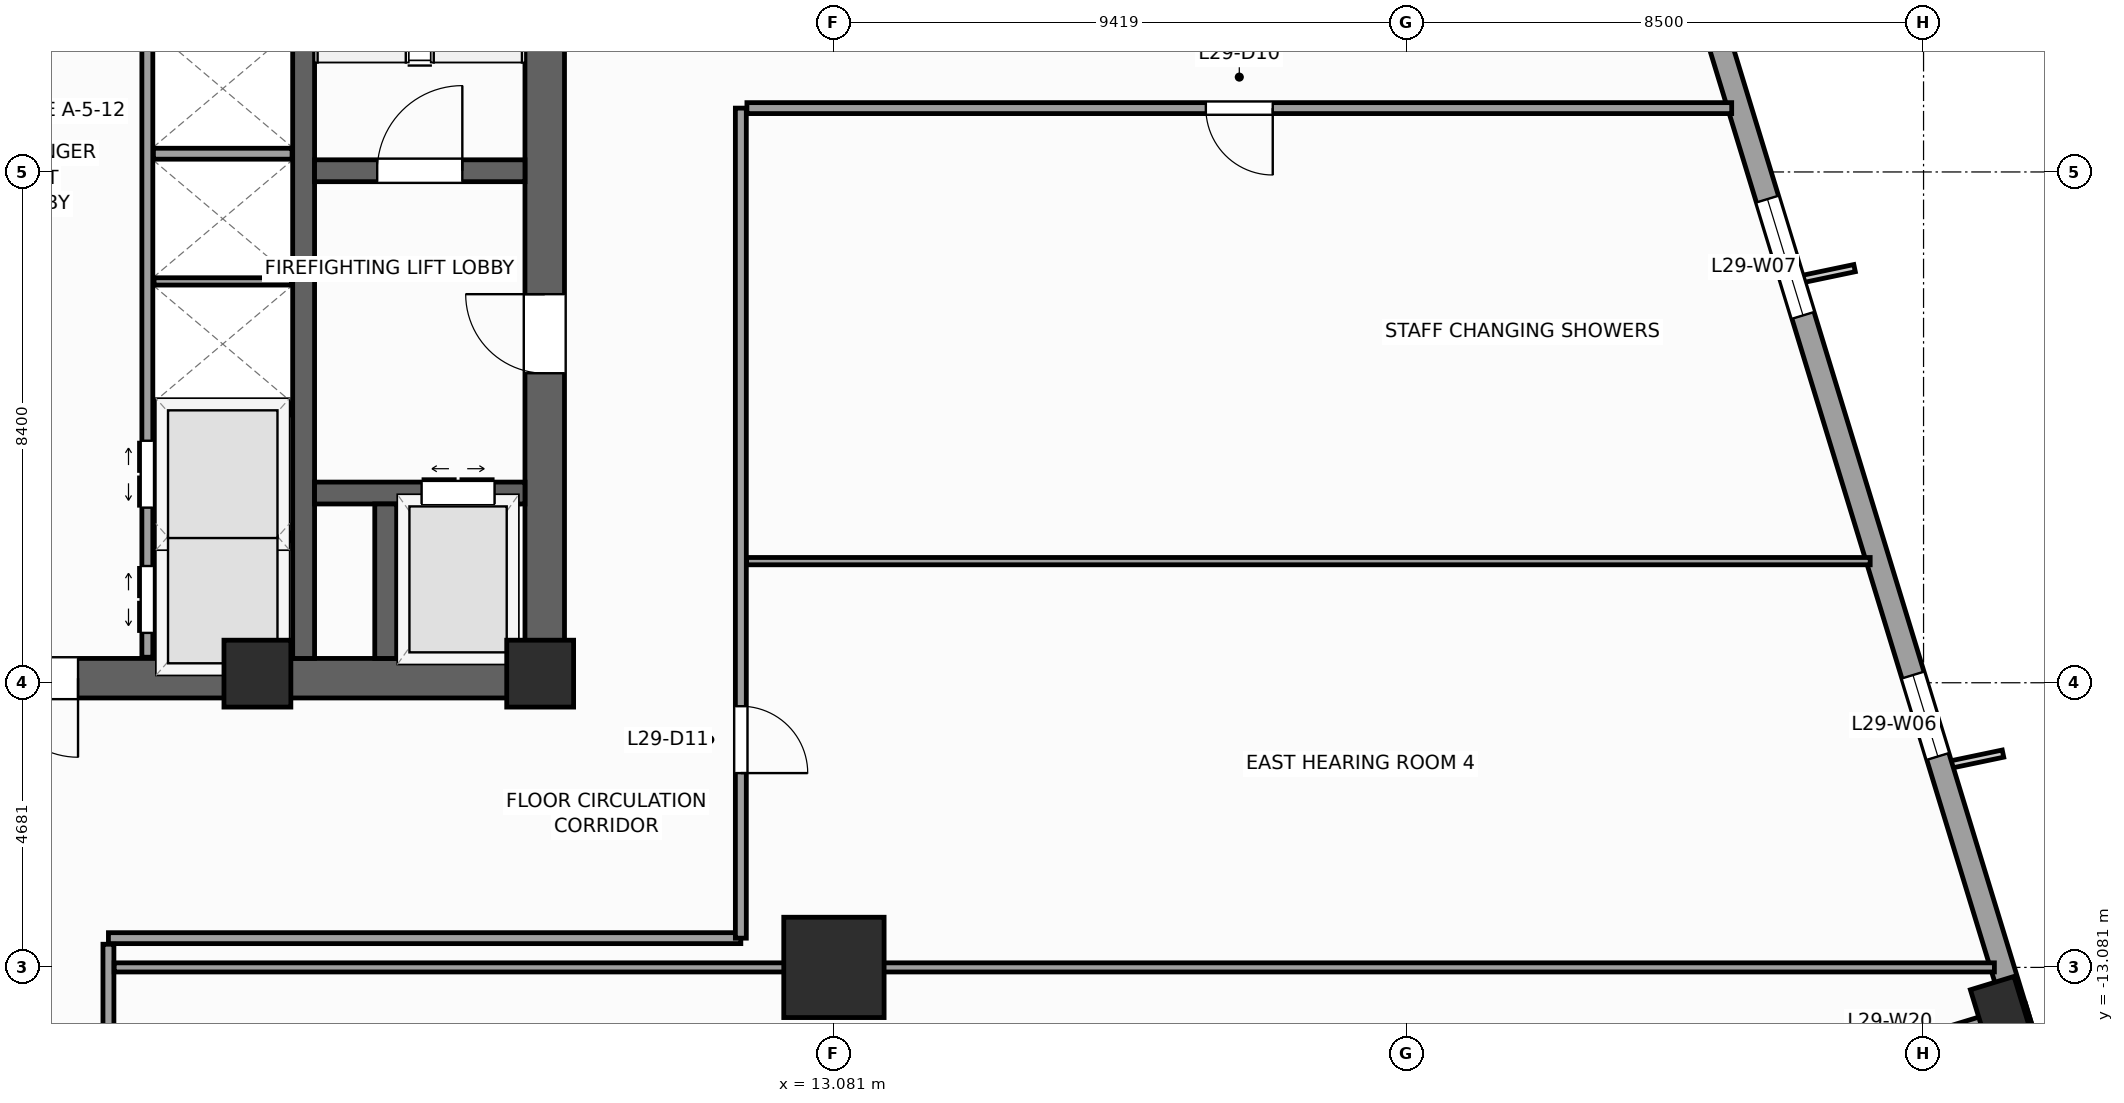
"""IFC4 building model, lengths in metres.
Left out: names, types, materials, properties, quantities, classifications, styles, units other than length and angle.
Written with IfcOpenShell. Run it as: python <this file> out.ifc"""

import sys

from ifc_helpers import new_model, si_unit, direction, frame, frame_2d, origin, origin_2d, place, context, subcontext, project, spatial, rectangle, extrude, source, transform, mapped, element, fill, save


model = new_model("IFC4")
c1 = context("Model", 3, precision=1e-05, world=origin(), true_north=direction((0.0, 1.0)))
c2 = subcontext(c1, "Body", "Model", "MODEL_VIEW")
j1 = project(units=[si_unit("LENGTHUNIT", "METRE"), si_unit("PLANEANGLEUNIT", "RADIAN")], contexts=[c1])
p1 = place(None, origin())
s1 = spatial("IfcSite", under=j1, at=p1, CompositionType="ELEMENT")
p2 = place(p1, origin())
s2 = spatial("IfcBuilding", under=s1, at=p2, CompositionType="ELEMENT")
p3 = place(p2, frame((0.0, 0.0, 123.2)))
s3 = spatial("IfcBuildingStorey", under=s2, at=p3, CompositionType="ELEMENT", Elevation=123.2)
p4 = place(p3, frame((-8.65, -8.325, 0.0), z_axis=(0.0, 0.0, 1.0), x_axis=(1.0, 0.0, 0.0)))
e1 = element("IfcWall", 1, at=p4, inside=s3, PredefinedType="SHEAR", context=c2, shape_type="SweptSolid", body=[
    extrude(rectangle(XDim=17.3, YDim=0.65, at=frame_2d((8.65, 0.0))), origin(), (0.0, 0.0, 1.0), 4.0),
])
p5 = place(p4, frame((8.0, 0.0, 0.0)))
e2 = element("IfcOpeningElement", 2, at=p5, cuts=e1, PredefinedType="OPENING", context=c2, shape_type="SweptSolid", body=[
    extrude(rectangle(XDim=1.3, YDim=2.2, at=frame_2d((0.65, 1.1))), frame((0.0, 0.335, 0.0), z_axis=(0.0, -1.0, 0.0), x_axis=(1.0, 0.0, 0.0)), (0.0, 0.0, 1.0), 0.67),
])
p6 = place(p3, frame((8.325, -8.0, 0.0), z_axis=(0.0, 0.0, 1.0), x_axis=(0.0, 1.0, 0.0)))
e3 = element("IfcWall", 3, at=p6, inside=s3, PredefinedType="SHEAR", context=c2, shape_type="SweptSolid", body=[
    extrude(rectangle(XDim=16.0, YDim=0.65, at=frame_2d((8.0, 0.0))), origin(), (0.0, 0.0, 1.0), 4.0),
])
p7 = place(p6, frame((4.69, 0.0, 0.0)))
e4 = element("IfcOpeningElement", 4, at=p7, cuts=e3, PredefinedType="OPENING", context=c2, shape_type="SweptSolid", body=[
    extrude(rectangle(XDim=1.3, YDim=2.2, at=frame_2d((0.65, 1.1))), frame((0.0, 0.335, 0.0), z_axis=(0.0, -1.0, 0.0), x_axis=(1.0, 0.0, 0.0)), (0.0, 0.0, 1.0), 0.67),
])
p8 = place(p3, frame((4.36, -8.0, 0.0), z_axis=(0.0, 0.0, 1.0), x_axis=(0.0, 1.0, 0.0)))
e5 = element("IfcWall", 5, at=p8, inside=s3, PredefinedType="SHEAR", context=c2, shape_type="SweptSolid", body=[
    extrude(rectangle(XDim=16.0, YDim=0.36, at=frame_2d((8.0, 0.0))), origin(), (0.0, 0.0, 1.0), 4.0),
])
p9 = place(p3, frame((4.54, 0.02, 0.0), z_axis=(0.0, 0.0, 1.0), x_axis=(1.0, 0.0, 0.0)))
e6 = element("IfcWall", 6, at=p9, inside=s3, PredefinedType="SHEAR", context=c2, shape_type="SweptSolid", body=[
    extrude(rectangle(XDim=3.46, YDim=0.36, at=frame_2d((1.73, 0.0))), origin(), (0.0, 0.0, 1.0), 4.0),
])
p10 = place(p9, frame((1.03, 0.0, 0.0)))
e7 = element("IfcOpeningElement", 7, at=p10, cuts=e6, PredefinedType="OPENING", context=c2, shape_type="SweptSolid", body=[
    extrude(rectangle(XDim=1.4, YDim=2.2, at=frame_2d((0.7, 1.1))), frame((0.0, 0.19, 0.0), z_axis=(0.0, -1.0, 0.0), x_axis=(1.0, 0.0, 0.0)), (0.0, 0.0, 1.0), 0.38),
])
p11 = place(p3, frame((4.54, -5.28, 0.0), z_axis=(0.0, 0.0, 1.0), x_axis=(1.0, 0.0, 0.0)))
e8 = element("IfcWall", 8, at=p11, inside=s3, PredefinedType="SHEAR", context=c2, shape_type="SweptSolid", body=[
    extrude(rectangle(XDim=3.46, YDim=0.36, at=frame_2d((1.73, 0.0))), origin(), (0.0, 0.0, 1.0), 4.0),
])
p12 = place(p11, frame((1.76, 0.0, 0.0)))
e9 = element("IfcOpeningElement", 9, at=p12, cuts=e8, PredefinedType="OPENING", context=c2, shape_type="SweptSolid", body=[
    extrude(rectangle(XDim=1.2, YDim=2.25, at=frame_2d((0.6, 1.125))), frame((0.0, 0.19, 0.0), z_axis=(0.0, -1.0, 0.0), x_axis=(1.0, 0.0, 0.0)), (0.0, 0.0, 1.0), 0.38),
])
p13 = place(p3, frame((5.71, -8.0, 0.0), z_axis=(0.0, 0.0, 1.0), x_axis=(0.0, 1.0, 0.0)))
e10 = element("IfcWall", 10, at=p13, inside=s3, PredefinedType="SHEAR", context=c2, shape_type="SweptSolid", body=[
    extrude(rectangle(XDim=2.54, YDim=0.36, at=frame_2d((1.27, 0.0))), origin(), (0.0, 0.0, 1.0), 4.0),
])
m1 = source(origin(), c2, "Body", "SweptSolid", [
    extrude(rectangle(XDim=1.1, YDim=1.1, at=origin_2d()), origin(), (0.0, 0.0, 1.0), 4.0),
])
for number, where, z_axis, x_axis in (
    (11, (8.25, -8.25, 0.0), (0.0, 0.0, 1.0), (1.0, 0.0, 0.0)),
    (12, (3.6, -8.25, 0.0), (0.0, 0.0, 1.0), (1.0, 0.0, 0.0)),
):
    element("IfcColumn", number, at=place(p3, frame(where, z_axis=z_axis, x_axis=x_axis)), inside=s3, PredefinedType="PILASTER", context=c2, shape_type="MappedRepresentation", body=[
        mapped(m1, transform((0.0, 0.0, 0.0), scale=1.0)),
    ])
m2 = source(origin(), c2, "Body", "SweptSolid", [
    extrude(rectangle(XDim=1.65, YDim=1.65, at=origin_2d()), origin(), (0.0, 0.0, 1.0), 4.0),
])
p14 = place(p3, frame((13.081, -13.081, 0.0), z_axis=(0.0, 0.0, 1.0), x_axis=(1.0, 0.0, 0.0)))
e13 = element("IfcColumn", 13, at=p14, inside=s3, PredefinedType="COLUMN", context=c2, shape_type="MappedRepresentation", body=[
    mapped(m2, transform((0.0, 0.0, 0.0), scale=1.0)),
])
m3 = source(origin(), c2, "Body", "SweptSolid", [
    extrude(rectangle(XDim=0.75, YDim=0.85, at=origin_2d()), origin(), (0.0, 0.0, 1.0), 4.0),
])
p15 = place(p3, frame((32.253, -13.746, 0.0), z_axis=(0.0, 0.0, 1.0), x_axis=(0.956304755963, 0.292371704723, 0.0)))
e14 = element("IfcColumn", 14, at=p15, inside=s3, PredefinedType="COLUMN", context=c2, shape_type="MappedRepresentation", body=[
    mapped(m3, transform((0.0, 0.0, 0.0), scale=1.0)),
])
p16 = place(p3, frame((28.482, -15.144, 0.0), z_axis=(0.0, 0.0, 1.0), x_axis=(0.956304176051, 0.292373601522, 0.0)))
e15 = element("IfcWall", 15, at=p16, inside=s3, PredefinedType="STANDARD", context=c2, shape_type="SweptSolid", body=[
    extrude(rectangle(XDim=4.44, YDim=0.38, at=frame_2d((2.22, 0.0))), origin(), (0.0, 0.0, 1.0), 3.04),
])
p17 = place(p16, frame((1.52, 0.0, 0.51)))
e16 = element("IfcOpeningElement", 16, at=p17, cuts=e15, PredefinedType="OPENING", context=c2, shape_type="SweptSolid", body=[
    extrude(rectangle(XDim=1.4, YDim=2.4, at=frame_2d((0.7, 1.2))), frame((0.0, 0.2, 0.0), z_axis=(0.0, -1.0, 0.0), x_axis=(1.0, 0.0, 0.0)), (0.0, 0.0, 1.0), 0.4),
])
p18 = place(p3, frame((32.658, -14.265, 0.0), z_axis=(0.0, 0.0, 1.0), x_axis=(-0.292373127906, 0.956304320851, 0.0)))
e17 = element("IfcWall", 17, at=p18, inside=s3, PredefinedType="STANDARD", context=c2, shape_type="SweptSolid", body=[
    extrude(rectangle(XDim=46.38, YDim=0.38, at=frame_2d((23.19, 0.0))), origin(), (0.0, 0.0, 1.0), 3.14),
])
p19 = place(p18, frame((4.865, 0.0, 0.51)))
e18 = element("IfcOpeningElement", 18, at=p19, cuts=e17, PredefinedType="OPENING", context=c2, shape_type="SweptSolid", body=[
    extrude(rectangle(XDim=1.4, YDim=2.4, at=frame_2d((0.7, 1.2))), frame((0.0, 0.2, 0.0), z_axis=(0.0, -1.0, 0.0), x_axis=(1.0, 0.0, 0.0)), (0.0, 0.0, 1.0), 0.4),
])
p20 = place(p18, frame((12.45, 0.0, 0.51)))
e19 = element("IfcOpeningElement", 19, at=p20, cuts=e17, PredefinedType="OPENING", context=c2, shape_type="SweptSolid", body=[
    extrude(rectangle(XDim=2.0, YDim=2.4, at=frame_2d((1.0, 1.2))), frame((0.0, 0.2, 0.0), z_axis=(0.0, -1.0, 0.0), x_axis=(1.0, 0.0, 0.0)), (0.0, 0.0, 1.0), 0.4),
])
p21 = place(p18, frame((30.538, 0.0, 0.51)))
e20 = element("IfcOpeningElement", 20, at=p21, cuts=e17, PredefinedType="OPENING", context=c2, shape_type="SweptSolid", body=[
    extrude(rectangle(XDim=2.0, YDim=2.4, at=frame_2d((1.0, 1.2))), frame((0.0, 0.2, 0.0), z_axis=(0.0, -1.0, 0.0), x_axis=(1.0, 0.0, 0.0)), (0.0, 0.0, 1.0), 0.4),
])
p22 = place(p18, frame((39.187, 0.0, 0.51)))
e21 = element("IfcOpeningElement", 21, at=p22, cuts=e17, PredefinedType="OPENING", context=c2, shape_type="SweptSolid", body=[
    extrude(rectangle(XDim=1.4, YDim=2.4, at=frame_2d((0.7, 1.2))), frame((0.0, 0.2, 0.0), z_axis=(0.0, -1.0, 0.0), x_axis=(1.0, 0.0, 0.0)), (0.0, 0.0, 1.0), 0.4),
])
p23 = place(p3, frame((1.79, -7.98, 0.0), z_axis=(0.0, 0.0, 1.0), x_axis=(0.0, 1.0, 0.0)))
e22 = element("IfcWall", 22, at=p23, inside=s3, PredefinedType="PARTITIONING", context=c2, shape_type="SweptSolid", body=[
    extrude(rectangle(XDim=12.38, YDim=0.18, at=frame_2d((6.19, 0.0))), origin(), (0.0, 0.0, 1.0), 3.74),
])
p24 = place(p23, frame((0.4, 0.0, 0.0)))
e23 = element("IfcOpeningElement", 23, at=p24, cuts=e22, PredefinedType="OPENING", context=c2, shape_type="SweptSolid", body=[
    extrude(rectangle(XDim=1.1, YDim=2.2, at=frame_2d((0.55, 1.1))), frame((0.0, 0.1, 0.0), z_axis=(0.0, -1.0, 0.0), x_axis=(1.0, 0.0, 0.0)), (0.0, 0.0, 1.0), 0.2),
])
p25 = place(p23, frame((2.46, 0.0, 0.0)))
e24 = element("IfcOpeningElement", 24, at=p25, cuts=e22, PredefinedType="OPENING", context=c2, shape_type="SweptSolid", body=[
    extrude(rectangle(XDim=1.1, YDim=2.2, at=frame_2d((0.55, 1.1))), frame((0.0, 0.1, 0.0), z_axis=(0.0, -1.0, 0.0), x_axis=(1.0, 0.0, 0.0)), (0.0, 0.0, 1.0), 0.2),
])
for number, where, z_axis, x_axis in (
    (25, (1.89, -3.9, 0.0), (0.0, 0.0, 1.0), (1.0, 0.0, 0.0)),
    (26, (1.89, 0.3, 0.0), (0.0, 0.0, 1.0), (1.0, 0.0, 0.0)),
):
    element("IfcWall", number, at=place(p3, frame(where, z_axis=z_axis, x_axis=x_axis)), inside=s3, PredefinedType="PARTITIONING", context=c2, shape_type="SweptSolid", body=[
        extrude(rectangle(XDim=2.28, YDim=0.18, at=frame_2d((1.14, 0.0))), origin(), (0.0, 0.0, 1.0), 3.74),
    ])
for number, where, z_axis, x_axis in (
    (27, (1.9, -6.0, 0.0), (0.0, 0.0, 1.0), (1.0, 0.0, 0.0)),
    (28, (1.9, -1.8, 0.0), (0.0, 0.0, 1.0), (1.0, 0.0, 0.0)),
):
    element("IfcWall", number, at=place(p3, frame(where, z_axis=z_axis, x_axis=x_axis)), inside=s3, PredefinedType="PARTITIONING", context=c2, shape_type="SweptSolid", body=[
        extrude(rectangle(XDim=2.26, YDim=0.12, at=frame_2d((1.13, 0.0))), origin(), (0.0, 0.0, 1.0), 3.74),
    ])
p26 = place(p3, frame((1.15, -12.6, 0.0), z_axis=(0.0, 0.0, 1.0), x_axis=(1.0, 0.0, 0.0)))
e29 = element("IfcWall", 29, at=p26, inside=s3, PredefinedType="PARTITIONING", context=c2, shape_type="SweptSolid", body=[
    extrude(rectangle(XDim=10.4, YDim=0.18, at=frame_2d((5.2, 0.0))), origin(), (0.0, 0.0, 1.0), 3.74),
])
p27 = place(p3, frame((11.55, -12.6, 0.0), z_axis=(0.0, 0.0, 1.0), x_axis=(0.0, 1.0, 0.0)))
e30 = element("IfcWall", 30, at=p27, inside=s3, PredefinedType="PARTITIONING", context=c2, shape_type="SweptSolid", body=[
    extrude(rectangle(XDim=13.65, YDim=0.18, at=frame_2d((6.825, 0.0))), origin(), (0.0, 0.0, 1.0), 3.74),
])
p28 = place(p27, frame((2.714, 0.0, 0.0)))
e31 = element("IfcOpeningElement", 31, at=p28, cuts=e30, PredefinedType="OPENING", context=c2, shape_type="SweptSolid", body=[
    extrude(rectangle(XDim=1.1, YDim=2.2, at=frame_2d((0.55, 1.1))), frame((0.0, 0.1, 0.0), z_axis=(0.0, -1.0, 0.0), x_axis=(1.0, 0.0, 0.0)), (0.0, 0.0, 1.0), 0.2),
])
p29 = place(p3, frame((11.65, 1.05, 0.0), z_axis=(0.0, 0.0, 1.0), x_axis=(1.0, 0.0, 0.0)))
e32 = element("IfcWall", 32, at=p29, inside=s3, PredefinedType="PARTITIONING", context=c2, shape_type="SweptSolid", body=[
    extrude(rectangle(XDim=16.195, YDim=0.18, at=frame_2d((8.097, 0.0))), origin(), (0.0, 0.0, 1.0), 3.74),
])
p30 = place(p29, frame((7.547, 0.0, 0.0)))
e33 = element("IfcOpeningElement", 33, at=p30, cuts=e32, PredefinedType="OPENING", context=c2, shape_type="SweptSolid", body=[
    extrude(rectangle(XDim=1.1, YDim=2.2, at=frame_2d((0.55, 1.1))), frame((0.0, 0.1, 0.0), z_axis=(0.0, -1.0, 0.0), x_axis=(1.0, 0.0, 0.0)), (0.0, 0.0, 1.0), 0.2),
])
p31 = place(p3, frame((1.15, -27.814, 0.0), z_axis=(0.0, 0.0, 1.0), x_axis=(0.0, 1.0, 0.0)))
e34 = element("IfcWall", 34, at=p31, inside=s3, PredefinedType="PARTITIONING", context=c2, shape_type="SweptSolid", body=[
    extrude(rectangle(XDim=15.114, YDim=0.18, at=frame_2d((7.557, 0.0))), origin(), (0.0, 0.0, 1.0), 3.41),
])
p32 = place(p31, frame((6.981, 0.0, 0.0)))
e35 = element("IfcOpeningElement", 35, at=p32, cuts=e34, PredefinedType="OPENING", context=c2, shape_type="SweptSolid", body=[
    extrude(rectangle(XDim=1.1, YDim=2.2, at=frame_2d((0.55, 1.1))), frame((0.0, 0.1, 0.0), z_axis=(0.0, -1.0, 0.0), x_axis=(1.0, 0.0, 0.0)), (0.0, 0.0, 1.0), 0.2),
])
p33 = place(p3, frame((1.245, -13.081, 0.0), z_axis=(0.0, 0.0, 1.0), x_axis=(1.0, 0.0, 0.0)))
e36 = element("IfcWall", 36, at=p33, inside=s3, PredefinedType="PARTITIONING", context=c2, shape_type="SweptSolid", body=[
    extrude(rectangle(XDim=30.92, YDim=0.15, at=frame_2d((15.46, 0.0))), origin(), (0.0, 0.0, 1.0), 2.732),
])
p34 = place(p3, frame((11.645, -6.4, 0.0), z_axis=(0.0, 0.0, 1.0), x_axis=(1.0, 0.0, 0.0)))
e37 = element("IfcWall", 37, at=p34, inside=s3, PredefinedType="PARTITIONING", context=c2, shape_type="SweptSolid", body=[
    extrude(rectangle(XDim=18.477, YDim=0.12, at=frame_2d((9.239, 0.0))), origin(), (0.0, 0.0, 1.0), 3.74),
])
m4 = source(origin(), c2, "Body", "SweptSolid", [
    extrude(rectangle(XDim=1.4, YDim=2.4, at=frame_2d((0.7, 1.2))), frame((0.0, 0.03, 0.0), z_axis=(0.0, -1.0, 0.0), x_axis=(1.0, 0.0, 0.0)), (0.0, 0.0, 1.0), 0.06),
])
p35 = place(p19, origin())
e38 = element("IfcWindow", 38, at=p35, inside=s3, PartitioningType="SINGLE_PANEL", PredefinedType="WINDOW", context=c2, shape_type="MappedRepresentation", body=[
    mapped(m4, transform((0.0, 0.0, 0.0), scale=1.0)),
])
fill(e18, e38)
m5 = source(origin(), c2, "Body", "SweptSolid", [
    extrude(rectangle(XDim=2.0, YDim=2.4, at=frame_2d((1.0, 1.2))), frame((0.0, 0.03, 0.0), z_axis=(0.0, -1.0, 0.0), x_axis=(1.0, 0.0, 0.0)), (0.0, 0.0, 1.0), 0.06),
])
p36 = place(p20, origin())
e39 = element("IfcWindow", 39, at=p36, inside=s3, PartitioningType="SINGLE_PANEL", PredefinedType="WINDOW", context=c2, shape_type="MappedRepresentation", body=[
    mapped(m5, transform((0.0, 0.0, 0.0), scale=1.0)),
])
fill(e19, e39)
m6 = source(origin(), c2, "Body", "SweptSolid", [
    extrude(rectangle(XDim=1.4, YDim=2.2, at=frame_2d((0.7, 1.1))), frame((0.0, 0.025, 0.0), z_axis=(0.0, -1.0, 0.0), x_axis=(1.0, 0.0, 0.0)), (0.0, 0.0, 1.0), 0.05),
])
p37 = place(p10, origin())
e40 = element("IfcDoor", 40, at=p37, inside=s3, OperationType="SINGLE_SWING_RIGHT", PredefinedType="DOOR", context=c2, shape_type="MappedRepresentation", body=[
    mapped(m6, transform((0.0, 0.0, 0.0), scale=1.0)),
])
fill(e7, e40)
m7 = source(origin(), c2, "Body", "SweptSolid", [
    extrude(rectangle(XDim=1.3, YDim=2.2, at=frame_2d((0.65, 1.1))), frame((0.0, 0.025, 0.0), z_axis=(0.0, -1.0, 0.0), x_axis=(1.0, 0.0, 0.0)), (0.0, 0.0, 1.0), 0.05),
])
p38 = place(p7, origin())
e41 = element("IfcDoor", 41, at=p38, inside=s3, OperationType="SINGLE_SWING_RIGHT", PredefinedType="DOOR", context=c2, shape_type="MappedRepresentation", body=[
    mapped(m7, transform((0.0, 0.0, 0.0), scale=1.0)),
])
fill(e4, e41)
p39 = place(p5, frame((1.3, 0.0, 0.0), z_axis=(0.0, 0.0, 1.0), x_axis=(-1.0, 0.0, 0.0)))
e42 = element("IfcDoor", 42, at=p39, inside=s3, OperationType="SINGLE_SWING_RIGHT", PredefinedType="DOOR", context=c2, shape_type="MappedRepresentation", body=[
    mapped(m7, transform((0.0, 0.0, 0.0), scale=1.0)),
])
fill(e2, e42)
m8 = source(origin(), c2, "Body", "SweptSolid", [
    extrude(rectangle(XDim=1.2, YDim=2.25, at=frame_2d((0.6, 1.125))), frame((0.0, 0.025, 0.0), z_axis=(0.0, -1.0, 0.0), x_axis=(1.0, 0.0, 0.0)), (0.0, 0.0, 1.0), 0.05),
])
p40 = place(p12, origin())
e43 = element("IfcDoor", 43, at=p40, inside=s3, OperationType="DOUBLE_DOOR_SLIDING", PredefinedType="DOOR", context=c2, shape_type="MappedRepresentation", body=[
    mapped(m8, transform((0.0, 0.0, 0.0), scale=1.0)),
])
fill(e9, e43)
m9 = source(origin(), c2, "Body", "SweptSolid", [
    extrude(rectangle(XDim=1.1, YDim=2.2, at=frame_2d((0.55, 1.1))), frame((0.0, 0.025, 0.0), z_axis=(0.0, -1.0, 0.0), x_axis=(1.0, 0.0, 0.0)), (0.0, 0.0, 1.0), 0.05),
])
p41 = place(p24, origin())
e44 = element("IfcDoor", 44, at=p41, inside=s3, OperationType="DOUBLE_DOOR_SLIDING", PredefinedType="DOOR", context=c2, shape_type="MappedRepresentation", body=[
    mapped(m9, transform((0.0, 0.0, 0.0), scale=1.0)),
])
fill(e23, e44)
p42 = place(p25, origin())
e45 = element("IfcDoor", 45, at=p42, inside=s3, OperationType="DOUBLE_DOOR_SLIDING", PredefinedType="DOOR", context=c2, shape_type="MappedRepresentation", body=[
    mapped(m9, transform((0.0, 0.0, 0.0), scale=1.0)),
])
fill(e24, e45)
p43 = place(p30, frame((1.1, 0.0, 0.0), z_axis=(0.0, 0.0, 1.0), x_axis=(-1.0, 0.0, 0.0)))
e46 = element("IfcDoor", 46, at=p43, inside=s3, OperationType="SINGLE_SWING_RIGHT", PredefinedType="DOOR", context=c2, shape_type="MappedRepresentation", body=[
    mapped(m9, transform((0.0, 0.0, 0.0), scale=1.0)),
])
fill(e33, e46)
p44 = place(p28, frame((1.1, 0.0, 0.0), z_axis=(0.0, 0.0, 1.0), x_axis=(-1.0, 0.0, 0.0)))
e47 = element("IfcDoor", 47, at=p44, inside=s3, OperationType="SINGLE_SWING_LEFT", PredefinedType="DOOR", context=c2, shape_type="MappedRepresentation", body=[
    mapped(m9, transform((0.0, 0.0, 0.0), scale=1.0)),
])
fill(e31, e47)
save(model, sys.argv[1])
